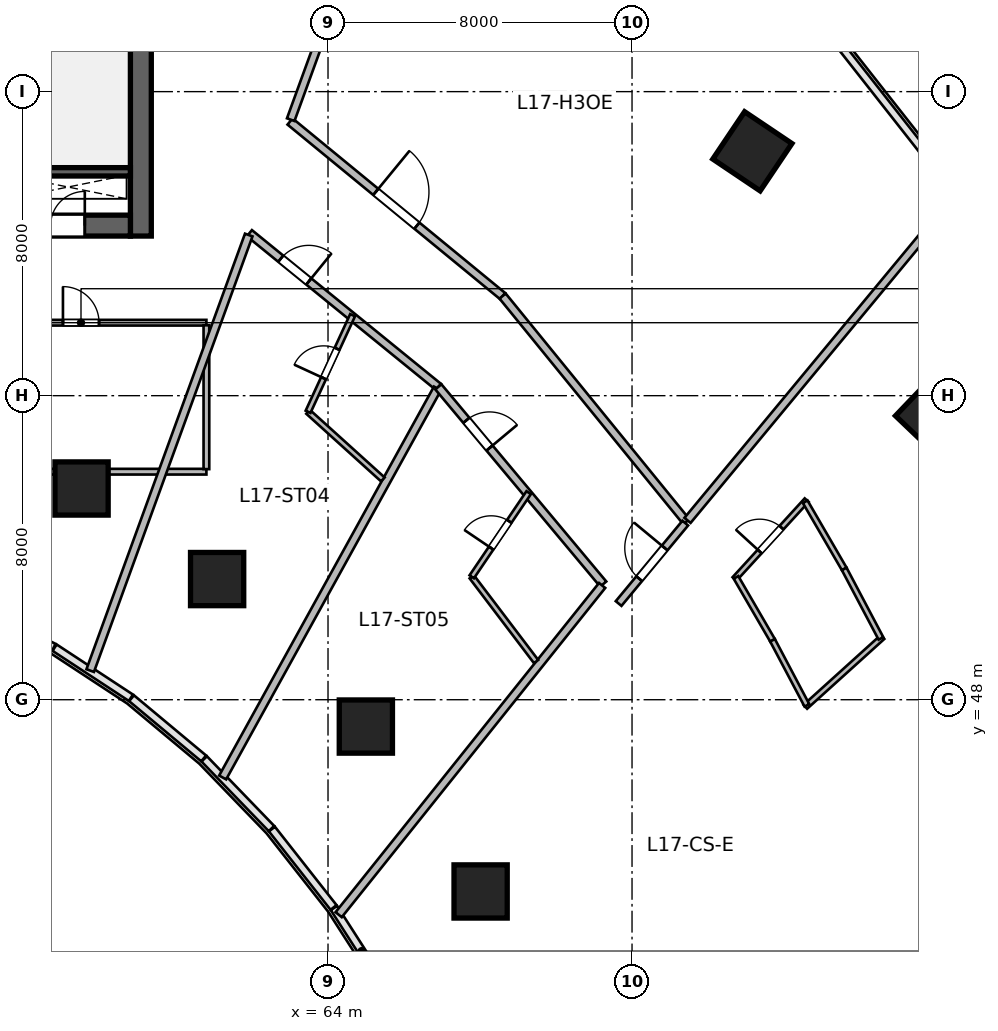
"""IFC4 building model, lengths in metres.
Left out: names, types, materials, properties, quantities, classifications, styles, units other than length and angle.
Written with IfcOpenShell. Run it as: python <this file> out.ifc"""

import sys

from ifc_helpers import new_model, si_unit, direction, frame, frame_2d, origin, origin_2d, place, context, subcontext, project, spatial, rectangle, circle, extrude, source, transform, mapped, element, fill, save


model = new_model("IFC4")
c1 = context("Model", 3, precision=1e-05, world=origin(), true_north=direction((0.0, 1.0)))
c2 = subcontext(c1, "Body", "Model", "MODEL_VIEW")
j1 = project(units=[si_unit("LENGTHUNIT", "METRE"), si_unit("PLANEANGLEUNIT", "RADIAN")], contexts=[c1])
p1 = place(None, origin())
s1 = spatial("IfcSite", under=j1, at=p1, CompositionType="ELEMENT")
p2 = place(p1, origin())
s2 = spatial("IfcBuilding", under=s1, at=p2, CompositionType="ELEMENT")
p3 = place(p2, frame((0.0, 0.0, 75.0)))
s3 = spatial("IfcBuildingStorey", under=s2, at=p3, CompositionType="ELEMENT", Elevation=75.0)
m1 = source(origin(), c2, "Body", "SweptSolid", [
    extrude(rectangle(XDim=12.0, YDim=0.55, at=frame_2d((6.0, 0.0))), origin(), (0.0, 0.0, 1.0), 3.6),
])
p4 = place(p3, frame((59.075, 60.2, 0.0), z_axis=(0.0, 0.0, 1.0), x_axis=(0.0, 1.0, 0.0)))
e1 = element("IfcWall", 1, at=p4, inside=s3, PredefinedType="SHEAR", context=c2, shape_type="MappedRepresentation", body=[
    mapped(m1, transform((0.0, 0.0, 0.0), scale=1.0)),
])
m2 = source(origin(), c2, "Body", "SweptSolid", [
    extrude(rectangle(XDim=21.6, YDim=0.55, at=frame_2d((10.8, 0.0))), origin(), (0.0, 0.0, 1.0), 3.6),
])
p5 = place(p3, frame((37.2, 60.475, 0.0), z_axis=(0.0, 0.0, 1.0), x_axis=(1.0, 0.0, 0.0)))
e2 = element("IfcWall", 2, at=p5, inside=s3, PredefinedType="SHEAR", context=c2, shape_type="MappedRepresentation", body=[
    mapped(m2, transform((0.0, 0.0, 0.0), scale=1.0)),
])
p6 = place(p5, frame((1.1, 0.0, 0.0)))
e3 = element("IfcOpeningElement", 3, at=p6, cuts=e2, PredefinedType="OPENING", context=c2, shape_type="SweptSolid", body=[
    extrude(rectangle(XDim=1.15, YDim=2.15, at=frame_2d((0.575, 1.075))), frame((0.0, 0.285, 0.0), z_axis=(0.0, -1.0, 0.0), x_axis=(1.0, 0.0, 0.0)), (0.0, 0.0, 1.0), 0.57),
])
p7 = place(p5, frame((19.5, 0.0, 0.0)))
e4 = element("IfcOpeningElement", 4, at=p7, cuts=e2, PredefinedType="OPENING", context=c2, shape_type="SweptSolid", body=[
    extrude(rectangle(XDim=0.9, YDim=2.1, at=frame_2d((0.45, 1.05))), frame((0.0, 0.285, 0.0), z_axis=(0.0, -1.0, 0.0), x_axis=(1.0, 0.0, 0.0)), (0.0, 0.0, 1.0), 0.57),
])
p8 = place(p5, frame((12.02, 0.0, 0.0)))
e5 = element("IfcOpeningElement", 5, at=p8, cuts=e2, PredefinedType="OPENING", context=c2, shape_type="SweptSolid", body=[
    extrude(rectangle(XDim=1.6, YDim=2.15, at=frame_2d((0.8, 1.075))), frame((0.0, 0.285, 0.0), z_axis=(0.0, -1.0, 0.0), x_axis=(1.0, 0.0, 0.0)), (0.0, 0.0, 1.0), 0.57),
])
m3 = source(origin(), c2, "Body", "SweptSolid", [
    extrude(rectangle(XDim=3.27, YDim=0.22, at=frame_2d((1.635, 0.0))), origin(), (0.0, 0.0, 1.0), 3.6),
])
p9 = place(p3, frame((55.53, 61.89, 0.0), z_axis=(0.0, 0.0, 1.0), x_axis=(1.0, 0.0, 0.0)))
e6 = element("IfcWall", 6, at=p9, inside=s3, PredefinedType="SHEAR", context=c2, shape_type="MappedRepresentation", body=[
    mapped(m3, transform((0.0, 0.0, 0.0), scale=1.0)),
])
m4 = source(origin(), c2, "Body", "SweptSolid", [
    extrude(circle(Radius=0.7, at=origin_2d()), origin(), (0.0, 0.0, 1.0), 3.6),
])
for number, where, z_axis, x_axis in (
    (7, (57.515, 53.558, 0.0), (0.0, 0.0, 1.0), (0.289, 0.957, 0.0)),
    (8, (61.082, 51.175, 0.0), (0.0, 0.0, 1.0), (0.409, 0.912, 0.0)),
    (9, (64.996, 47.294, 0.0), (0.0, 0.0, 1.0), (0.558, 0.83, 0.0)),
):
    element("IfcColumn", number, at=place(p3, frame(where, z_axis=z_axis, x_axis=x_axis)), inside=s3, PredefinedType="COLUMN", context=c2, shape_type="MappedRepresentation", body=[
        mapped(m4, transform((0.0, 0.0, 0.0), scale=1.0)),
    ])
m5 = source(origin(), c2, "Body", "SweptSolid", [
    extrude(rectangle(XDim=1.5, YDim=1.5, at=origin_2d()), origin(), (0.0, 0.0, 1.0), 3.6),
])
p10 = place(p3, frame((75.167, 62.43, 0.0), z_axis=(0.0, 0.0, 1.0), x_axis=(0.55774510898, 0.830012285095, 0.0)))
e10 = element("IfcColumn", 10, at=p10, inside=s3, PredefinedType="COLUMN", context=c2, shape_type="MappedRepresentation", body=[
    mapped(m5, transform((0.0, 0.0, 0.0), scale=1.0)),
])
p11 = place(p3, frame((68.015, 42.955, 0.0), z_axis=(0.0, 0.0, 1.0), x_axis=(0.690756218984, 0.723087716626, 0.0)))
e11 = element("IfcColumn", 11, at=p11, inside=s3, PredefinedType="COLUMN", context=c2, shape_type="MappedRepresentation", body=[
    mapped(m4, transform((0.0, 0.0, 0.0), scale=1.0)),
])
p12 = place(p3, frame((79.993, 55.494, 0.0), z_axis=(0.0, 0.0, 1.0), x_axis=(0.690756218984, 0.723087716626, 0.0)))
e12 = element("IfcColumn", 12, at=p12, inside=s3, PredefinedType="COLUMN", context=c2, shape_type="MappedRepresentation", body=[
    mapped(m5, transform((0.0, 0.0, 0.0), scale=1.0)),
])
m6 = source(origin(), c2, "Body", "SweptSolid", [
    extrude(rectangle(XDim=6.6, YDim=0.15, at=frame_2d((3.3, 0.0))), origin(), (0.0, 0.0, 1.0), 2.803),
])
p13 = place(p3, frame((54.2, 54.0, 0.0), z_axis=(0.0, 0.0, 1.0), x_axis=(1.0, 0.0, 0.0)))
e13 = element("IfcWall", 13, at=p13, inside=s3, PredefinedType="PARTITIONING", context=c2, shape_type="MappedRepresentation", body=[
    mapped(m6, transform((0.0, 0.0, 0.0), scale=1.0)),
])
m7 = source(origin(), c2, "Body", "SweptSolid", [
    extrude(rectangle(XDim=6.6, YDim=0.15, at=frame_2d((3.3, 0.0))), origin(), (0.0, 0.0, 1.0), 3.36),
])
p14 = place(p3, frame((54.2, 57.92, 0.0), z_axis=(0.0, 0.0, 1.0), x_axis=(1.0, 0.0, 0.0)))
e14 = element("IfcWall", 14, at=p14, inside=s3, PredefinedType="PARTITIONING", context=c2, shape_type="MappedRepresentation", body=[
    mapped(m7, transform((0.0, 0.0, 0.0), scale=1.0)),
])
p15 = place(p14, frame((2.825, 0.0, 0.0)))
e15 = element("IfcOpeningElement", 15, at=p15, cuts=e14, PredefinedType="OPENING", context=c2, shape_type="SweptSolid", body=[
    extrude(rectangle(XDim=0.95, YDim=2.1, at=frame_2d((0.475, 1.05))), frame((0.0, 0.085, 0.0), z_axis=(0.0, -1.0, 0.0), x_axis=(1.0, 0.0, 0.0)), (0.0, 0.0, 1.0), 0.17),
])
m8 = source(origin(), c2, "Body", "SweptSolid", [
    extrude(rectangle(XDim=3.785, YDim=0.15, at=frame_2d((1.893, 0.0))), origin(), (0.0, 0.0, 1.0), 3.36),
])
p16 = place(p3, frame((60.8, 54.067, 0.0), z_axis=(0.0, 0.0, 1.0), x_axis=(0.0, 1.0, 0.0)))
e16 = element("IfcWall", 16, at=p16, inside=s3, PredefinedType="PARTITIONING", context=c2, shape_type="MappedRepresentation", body=[
    mapped(m8, transform((0.0, 0.0, 0.0), scale=1.0)),
])
m9 = source(origin(), c2, "Body", "SweptSolid", [
    extrude(rectangle(XDim=7.237, YDim=0.21, at=frame_2d((3.618, 0.0))), origin(), (0.0, 0.0, 1.0), 3.36),
])
p17 = place(p3, frame((63.001, 63.214, 0.0), z_axis=(0.0, 0.0, 1.0), x_axis=(0.772813707793, -0.634632943557, 0.0)))
e17 = element("IfcWall", 17, at=p17, inside=s3, PredefinedType="PARTITIONING", context=c2, shape_type="MappedRepresentation", body=[
    mapped(m9, transform((0.0, 0.0, 0.0), scale=1.0)),
])
p18 = place(p17, frame((2.918, 0.0, 0.0)))
e18 = element("IfcOpeningElement", 18, at=p18, cuts=e17, PredefinedType="OPENING", context=c2, shape_type="SweptSolid", body=[
    extrude(rectangle(XDim=1.4, YDim=2.15, at=frame_2d((0.7, 1.075))), frame((0.0, 0.115, 0.0), z_axis=(0.0, -1.0, 0.0), x_axis=(1.0, 0.0, 0.0)), (0.0, 0.0, 1.0), 0.23),
])
m10 = source(origin(), c2, "Body", "SweptSolid", [
    extrude(rectangle(XDim=7.659, YDim=0.21, at=frame_2d((3.829, 0.0))), origin(), (0.0, 0.0, 1.0), 3.36),
])
p19 = place(p3, frame((68.594, 58.621, 0.0), z_axis=(0.0, 0.0, 1.0), x_axis=(0.631489868862, -0.775384127723, 0.0)))
e19 = element("IfcWall", 19, at=p19, inside=s3, PredefinedType="PARTITIONING", context=c2, shape_type="MappedRepresentation", body=[
    mapped(m10, transform((0.0, 0.0, 0.0), scale=1.0)),
])
m11 = source(origin(), c2, "Body", "SweptSolid", [
    extrude(rectangle(XDim=12.088, YDim=0.21, at=frame_2d((6.044, 0.0))), origin(), (0.0, 0.0, 1.0), 3.36),
])
p20 = place(p3, frame((63.019, 63.262, 0.0), z_axis=(0.0, 0.0, 1.0), x_axis=(0.34203007529, 0.939689005787, 0.0)))
e20 = element("IfcWall", 20, at=p20, inside=s3, PredefinedType="PARTITIONING", context=c2, shape_type="MappedRepresentation", body=[
    mapped(m11, transform((0.0, 0.0, 0.0), scale=1.0)),
])
m12 = source(origin(), c2, "Body", "SweptSolid", [
    extrude(rectangle(XDim=10.975, YDim=0.21, at=frame_2d((5.487, 0.0))), origin(), (0.0, 0.0, 1.0), 3.36),
])
p21 = place(p3, frame((73.46, 52.719, 0.0), z_axis=(0.0, 0.0, 1.0), x_axis=(0.638125265812, 0.769932558821, 0.0)))
e21 = element("IfcWall", 21, at=p21, inside=s3, PredefinedType="PARTITIONING", context=c2, shape_type="MappedRepresentation", body=[
    mapped(m12, transform((0.0, 0.0, 0.0), scale=1.0)),
])
m13 = source(origin(), c2, "Body", "SweptSolid", [
    extrude(rectangle(XDim=6.408, YDim=0.21, at=frame_2d((3.204, 0.0))), origin(), (0.0, 0.0, 1.0), 3.36),
])
p22 = place(p3, frame((61.931, 60.275, 0.0), z_axis=(0.0, 0.0, 1.0), x_axis=(0.775878552904, -0.630882295792, 0.0)))
e22 = element("IfcWall", 22, at=p22, inside=s3, PredefinedType="PARTITIONING", context=c2, shape_type="MappedRepresentation", body=[
    mapped(m13, transform((0.0, 0.0, 0.0), scale=1.0)),
])
p23 = place(p22, frame((1.063, 0.0, 0.0)))
e23 = element("IfcOpeningElement", 23, at=p23, cuts=e22, PredefinedType="OPENING", context=c2, shape_type="SweptSolid", body=[
    extrude(rectangle(XDim=0.95, YDim=2.15, at=frame_2d((0.475, 1.075))), frame((0.0, 0.115, 0.0), z_axis=(0.0, -1.0, 0.0), x_axis=(1.0, 0.0, 0.0)), (0.0, 0.0, 1.0), 0.23),
])
m14 = source(origin(), c2, "Body", "SweptSolid", [
    extrude(rectangle(XDim=12.196, YDim=0.21, at=frame_2d((6.098, 0.0))), origin(), (0.0, 0.0, 1.0), 3.36),
])
p24 = place(p3, frame((57.742, 48.766, 0.0), z_axis=(0.0, 0.0, 1.0), x_axis=(0.342022711534, 0.939691686031, 0.0)))
e24 = element("IfcWall", 24, at=p24, inside=s3, PredefinedType="PARTITIONING", context=c2, shape_type="MappedRepresentation", body=[
    mapped(m14, transform((0.0, 0.0, 0.0), scale=1.0)),
])
m15 = source(origin(), c2, "Body", "SweptSolid", [
    extrude(rectangle(XDim=11.692, YDim=0.21, at=frame_2d((5.846, 0.0))), origin(), (0.0, 0.0, 1.0), 2.99),
])
p25 = place(p3, frame((61.228, 45.954, 0.0), z_axis=(0.0, 0.0, 1.0), x_axis=(0.483398579324, 0.875400373262, 0.0)))
e25 = element("IfcWall", 25, at=p25, inside=s3, PredefinedType="PARTITIONING", context=c2, shape_type="MappedRepresentation", body=[
    mapped(m15, transform((0.0, 0.0, 0.0), scale=1.0)),
])
m16 = source(origin(), c2, "Body", "SweptSolid", [
    extrude(rectangle(XDim=2.653, YDim=0.14, at=frame_2d((1.327, 0.0))), origin(), (0.0, 0.0, 1.0), 3.36),
])
p26 = place(p3, frame((63.475, 55.576, 0.0), z_axis=(0.0, 0.0, 1.0), x_axis=(0.741731938744, -0.67069645224, 0.0)))
e26 = element("IfcWall", 26, at=p26, inside=s3, PredefinedType="PARTITIONING", context=c2, shape_type="MappedRepresentation", body=[
    mapped(m16, transform((0.0, 0.0, 0.0), scale=1.0)),
])
m17 = source(origin(), c2, "Body", "SweptSolid", [
    extrude(rectangle(XDim=2.799, YDim=0.14, at=frame_2d((1.4, 0.0))), origin(), (0.0, 0.0, 1.0), 3.36),
])
p27 = place(p3, frame((63.475, 55.576, 0.0), z_axis=(0.0, 0.0, 1.0), x_axis=(0.418626740412, 0.908158384981, 0.0)))
e27 = element("IfcWall", 27, at=p27, inside=s3, PredefinedType="PARTITIONING", context=c2, shape_type="MappedRepresentation", body=[
    mapped(m17, transform((0.0, 0.0, 0.0), scale=1.0)),
])
p28 = place(p27, frame((0.975, 0.0, 0.0)))
e28 = element("IfcOpeningElement", 28, at=p28, cuts=e27, PredefinedType="OPENING", context=c2, shape_type="SweptSolid", body=[
    extrude(rectangle(XDim=0.85, YDim=2.05, at=frame_2d((0.425, 1.025))), frame((0.0, 0.08, 0.0), z_axis=(0.0, -1.0, 0.0), x_axis=(1.0, 0.0, 0.0)), (0.0, 0.0, 1.0), 0.16),
])
m18 = source(origin(), c2, "Body", "SweptSolid", [
    extrude(rectangle(XDim=6.764, YDim=0.21, at=frame_2d((3.382, 0.0))), origin(), (0.0, 0.0, 1.0), 3.36),
])
p29 = place(p3, frame((66.904, 56.232, 0.0), z_axis=(0.0, 0.0, 1.0), x_axis=(0.641433176235, -0.767178910311, 0.0)))
e29 = element("IfcWall", 29, at=p29, inside=s3, PredefinedType="PARTITIONING", context=c2, shape_type="MappedRepresentation", body=[
    mapped(m18, transform((0.0, 0.0, 0.0), scale=1.0)),
])
p30 = place(p29, frame((1.148, 0.0, 0.0)))
e30 = element("IfcOpeningElement", 30, at=p30, cuts=e29, PredefinedType="OPENING", context=c2, shape_type="SweptSolid", body=[
    extrude(rectangle(XDim=0.95, YDim=2.15, at=frame_2d((0.475, 1.075))), frame((0.0, 0.115, 0.0), z_axis=(0.0, -1.0, 0.0), x_axis=(1.0, 0.0, 0.0)), (0.0, 0.0, 1.0), 0.23),
])
m19 = source(origin(), c2, "Body", "SweptSolid", [
    extrude(rectangle(XDim=11.095, YDim=0.21, at=frame_2d((5.548, 0.0))), origin(), (0.0, 0.0, 1.0), 2.99),
])
p31 = place(p3, frame((64.281, 42.344, 0.0), z_axis=(0.0, 0.0, 1.0), x_axis=(0.6248131083, 0.780774346208, 0.0)))
e31 = element("IfcWall", 31, at=p31, inside=s3, PredefinedType="PARTITIONING", context=c2, shape_type="MappedRepresentation", body=[
    mapped(m19, transform((0.0, 0.0, 0.0), scale=1.0)),
])
m20 = source(origin(), c2, "Body", "SweptSolid", [
    extrude(rectangle(XDim=2.8, YDim=0.14, at=frame_2d((1.4, 0.0))), origin(), (0.0, 0.0, 1.0), 3.36),
])
p32 = place(p3, frame((67.782, 51.234, 0.0), z_axis=(0.0, 0.0, 1.0), x_axis=(0.604607833789, -0.796523299923, 0.0)))
e32 = element("IfcWall", 32, at=p32, inside=s3, PredefinedType="PARTITIONING", context=c2, shape_type="MappedRepresentation", body=[
    mapped(m20, transform((0.0, 0.0, 0.0), scale=1.0)),
])
m21 = source(origin(), c2, "Body", "SweptSolid", [
    extrude(rectangle(XDim=2.673, YDim=0.14, at=frame_2d((1.336, 0.0))), origin(), (0.0, 0.0, 1.0), 2.644),
])
p33 = place(p3, frame((67.782, 51.234, 0.0), z_axis=(0.0, 0.0, 1.0), x_axis=(0.560399679065, 0.828222312972, 0.0)))
e33 = element("IfcWall", 33, at=p33, inside=s3, PredefinedType="PARTITIONING", context=c2, shape_type="MappedRepresentation", body=[
    mapped(m21, transform((0.0, 0.0, 0.0), scale=1.0)),
])
p34 = place(p33, frame((0.911, 0.0, 0.0)))
e34 = element("IfcOpeningElement", 34, at=p34, cuts=e33, PredefinedType="OPENING", context=c2, shape_type="SweptSolid", body=[
    extrude(rectangle(XDim=0.85, YDim=2.05, at=frame_2d((0.425, 1.025))), frame((0.0, 0.08, 0.0), z_axis=(0.0, -1.0, 0.0), x_axis=(1.0, 0.0, 0.0)), (0.0, 0.0, 1.0), 0.16),
])
m22 = source(origin(), c2, "Body", "SweptSolid", [
    extrude(rectangle(XDim=2.748, YDim=0.195, at=frame_2d((1.374, 0.0))), origin(), (0.0, 0.0, 1.0), 3.36),
])
p35 = place(p3, frame((71.647, 50.531, 0.0), z_axis=(0.0, 0.0, 1.0), x_axis=(0.638111168284, 0.769944242729, 0.0)))
e35 = element("IfcWall", 35, at=p35, inside=s3, PredefinedType="PARTITIONING", context=c2, shape_type="MappedRepresentation", body=[
    mapped(m22, transform((0.0, 0.0, 0.0), scale=1.0)),
])
p36 = place(p35, frame((0.849, 0.0, 0.0)))
e36 = element("IfcOpeningElement", 36, at=p36, cuts=e35, PredefinedType="OPENING", context=c2, shape_type="SweptSolid", body=[
    extrude(rectangle(XDim=1.05, YDim=2.15, at=frame_2d((0.525, 1.075))), frame((0.0, 0.107, 0.0), z_axis=(0.0, -1.0, 0.0), x_axis=(1.0, 0.0, 0.0)), (0.0, 0.0, 1.0), 0.215),
])
m23 = source(origin(), c2, "Body", "SweptSolid", [
    extrude(rectangle(XDim=2.812, YDim=0.14, at=frame_2d((1.406, 0.0))), origin(), (0.0, 0.0, 1.0), 3.36),
])
p37 = place(p3, frame((74.697, 51.177, 0.0), z_axis=(0.0, 0.0, 1.0), x_axis=(0.675119025852, 0.737708818527, 0.0)))
e37 = element("IfcWall", 37, at=p37, inside=s3, PredefinedType="PARTITIONING", context=c2, shape_type="MappedRepresentation", body=[
    mapped(m23, transform((0.0, 0.0, 0.0), scale=1.0)),
])
p38 = place(p37, frame((0.981, 0.0, 0.0)))
e38 = element("IfcOpeningElement", 38, at=p38, cuts=e37, PredefinedType="OPENING", context=c2, shape_type="SweptSolid", body=[
    extrude(rectangle(XDim=0.85, YDim=2.05, at=frame_2d((0.425, 1.025))), frame((0.0, 0.08, 0.0), z_axis=(0.0, -1.0, 0.0), x_axis=(1.0, 0.0, 0.0)), (0.0, 0.0, 1.0), 0.16),
])
m24 = source(origin(), c2, "Body", "SweptSolid", [
    extrude(rectangle(XDim=2.738, YDim=0.14, at=frame_2d((1.369, 0.0))), origin(), (0.0, 0.0, 1.0), 3.36),
])
p39 = place(p3, frame((76.56, 47.814, 0.0), z_axis=(0.0, 0.0, 1.0), x_axis=(0.741873676582, 0.670539669218, 0.0)))
e39 = element("IfcWall", 39, at=p39, inside=s3, PredefinedType="PARTITIONING", context=c2, shape_type="MappedRepresentation", body=[
    mapped(m24, transform((0.0, 0.0, 0.0), scale=1.0)),
])
m25 = source(origin(), c2, "Body", "SweptSolid", [
    extrude(rectangle(XDim=1.914, YDim=0.14, at=frame_2d((0.957, 0.0))), origin(), (0.0, 0.0, 1.0), 3.36),
])
p40 = place(p3, frame((74.736, 51.219, 0.0), z_axis=(0.0, 0.0, 1.0), x_axis=(0.502347790612, -0.864665656347, 0.0)))
e40 = element("IfcWall", 40, at=p40, inside=s3, PredefinedType="PARTITIONING", context=c2, shape_type="MappedRepresentation", body=[
    mapped(m25, transform((0.0, 0.0, 0.0), scale=1.0)),
])
m26 = source(origin(), c2, "Body", "SweptSolid", [
    extrude(rectangle(XDim=2.045, YDim=0.14, at=frame_2d((1.022, 0.0))), origin(), (0.0, 0.0, 1.0), 3.36),
])
p41 = place(p3, frame((76.557, 53.209, 0.0), z_axis=(0.0, 0.0, 1.0), x_axis=(0.5023112139, -0.864686905411, 0.0)))
e41 = element("IfcWall", 41, at=p41, inside=s3, PredefinedType="PARTITIONING", context=c2, shape_type="MappedRepresentation", body=[
    mapped(m26, transform((0.0, 0.0, 0.0), scale=1.0)),
])
m27 = source(origin(), c2, "Body", "SweptSolid", [
    extrude(rectangle(XDim=1.936, YDim=0.14, at=frame_2d((0.968, 0.0))), origin(), (0.0, 0.0, 1.0), 3.36),
])
p42 = place(p3, frame((75.697, 49.563, 0.0), z_axis=(0.0, 0.0, 1.0), x_axis=(0.467174971862, -0.884164886017, 0.0)))
e42 = element("IfcWall", 42, at=p42, inside=s3, PredefinedType="PARTITIONING", context=c2, shape_type="MappedRepresentation", body=[
    mapped(m27, transform((0.0, 0.0, 0.0), scale=1.0)),
])
m28 = source(origin(), c2, "Body", "SweptSolid", [
    extrude(rectangle(XDim=2.068, YDim=0.14, at=frame_2d((1.034, 0.0))), origin(), (0.0, 0.0, 1.0), 3.36),
])
p43 = place(p3, frame((77.584, 51.441, 0.0), z_axis=(0.0, 0.0, 1.0), x_axis=(0.467215057643, -0.884143704333, 0.0)))
e43 = element("IfcWall", 43, at=p43, inside=s3, PredefinedType="PARTITIONING", context=c2, shape_type="MappedRepresentation", body=[
    mapped(m28, transform((0.0, 0.0, 0.0), scale=1.0)),
])
m29 = source(origin(), c2, "Body", "SweptSolid", [
    extrude(rectangle(XDim=0.9, YDim=2.1, at=frame_2d((0.45, 1.05))), frame((0.0, 0.025, 0.0), z_axis=(0.0, -1.0, 0.0), x_axis=(1.0, 0.0, 0.0)), (0.0, 0.0, 1.0), 0.05),
])
p44 = place(p7, origin())
e44 = element("IfcDoor", 44, at=p44, inside=s3, OperationType="SINGLE_SWING_RIGHT", PredefinedType="DOOR", context=c2, shape_type="MappedRepresentation", body=[
    mapped(m29, transform((0.0, 0.0, 0.0), scale=1.0)),
])
fill(e4, e44)
m30 = source(origin(), c2, "Body", "SweptSolid", [
    extrude(rectangle(XDim=0.95, YDim=2.1, at=frame_2d((0.475, 1.05))), frame((0.0, 0.025, 0.0), z_axis=(0.0, -1.0, 0.0), x_axis=(1.0, 0.0, 0.0)), (0.0, 0.0, 1.0), 0.05),
])
p45 = place(p15, origin())
e45 = element("IfcDoor", 45, at=p45, inside=s3, OperationType="SINGLE_SWING_LEFT", PredefinedType="DOOR", context=c2, shape_type="MappedRepresentation", body=[
    mapped(m30, transform((0.0, 0.0, 0.0), scale=1.0)),
])
fill(e15, e45)
m31 = source(origin(), c2, "Body", "SweptSolid", [
    extrude(rectangle(XDim=1.4, YDim=2.15, at=frame_2d((0.7, 1.075))), frame((0.0, 0.025, 0.0), z_axis=(0.0, -1.0, 0.0), x_axis=(1.0, 0.0, 0.0)), (0.0, 0.0, 1.0), 0.05),
])
p46 = place(p18, origin())
e46 = element("IfcDoor", 46, at=p46, inside=s3, OperationType="SINGLE_SWING_LEFT", PredefinedType="DOOR", context=c2, shape_type="MappedRepresentation", body=[
    mapped(m31, transform((0.0, 0.0, 0.0), scale=1.0)),
])
fill(e18, e46)
m32 = source(origin(), c2, "Body", "SweptSolid", [
    extrude(rectangle(XDim=0.95, YDim=2.15, at=frame_2d((0.475, 1.075))), frame((0.0, 0.025, 0.0), z_axis=(0.0, -1.0, 0.0), x_axis=(1.0, 0.0, 0.0)), (0.0, 0.0, 1.0), 0.05),
])
p47 = place(p23, origin())
e47 = element("IfcDoor", 47, at=p47, inside=s3, OperationType="SINGLE_SWING_RIGHT", PredefinedType="DOOR", context=c2, shape_type="MappedRepresentation", body=[
    mapped(m32, transform((0.0, 0.0, 0.0), scale=1.0)),
])
fill(e23, e47)
m33 = source(origin(), c2, "Body", "SweptSolid", [
    extrude(rectangle(XDim=0.85, YDim=2.05, at=frame_2d((0.425, 1.025))), frame((0.0, 0.025, 0.0), z_axis=(0.0, -1.0, 0.0), x_axis=(1.0, 0.0, 0.0)), (0.0, 0.0, 1.0), 0.05),
])
p48 = place(p28, origin())
e48 = element("IfcDoor", 48, at=p48, inside=s3, OperationType="SINGLE_SWING_LEFT", PredefinedType="DOOR", context=c2, shape_type="MappedRepresentation", body=[
    mapped(m33, transform((0.0, 0.0, 0.0), scale=1.0)),
])
fill(e28, e48)
p49 = place(p30, origin())
e49 = element("IfcDoor", 49, at=p49, inside=s3, OperationType="SINGLE_SWING_RIGHT", PredefinedType="DOOR", context=c2, shape_type="MappedRepresentation", body=[
    mapped(m32, transform((0.0, 0.0, 0.0), scale=1.0)),
])
fill(e30, e49)
p50 = place(p34, origin())
e50 = element("IfcDoor", 50, at=p50, inside=s3, OperationType="SINGLE_SWING_LEFT", PredefinedType="DOOR", context=c2, shape_type="MappedRepresentation", body=[
    mapped(m33, transform((0.0, 0.0, 0.0), scale=1.0)),
])
fill(e34, e50)
m34 = source(origin(), c2, "Body", "SweptSolid", [
    extrude(rectangle(XDim=1.05, YDim=2.15, at=frame_2d((0.525, 1.075))), frame((0.0, 0.025, 0.0), z_axis=(0.0, -1.0, 0.0), x_axis=(1.0, 0.0, 0.0)), (0.0, 0.0, 1.0), 0.05),
])
p51 = place(p36, origin())
e51 = element("IfcDoor", 51, at=p51, inside=s3, OperationType="SINGLE_SWING_RIGHT", PredefinedType="DOOR", context=c2, shape_type="MappedRepresentation", body=[
    mapped(m34, transform((0.0, 0.0, 0.0), scale=1.0)),
])
fill(e36, e51)
p52 = place(p38, origin())
e52 = element("IfcDoor", 52, at=p52, inside=s3, OperationType="SINGLE_SWING_LEFT", PredefinedType="DOOR", context=c2, shape_type="MappedRepresentation", body=[
    mapped(m33, transform((0.0, 0.0, 0.0), scale=1.0)),
])
fill(e38, e52)
save(model, sys.argv[1])
